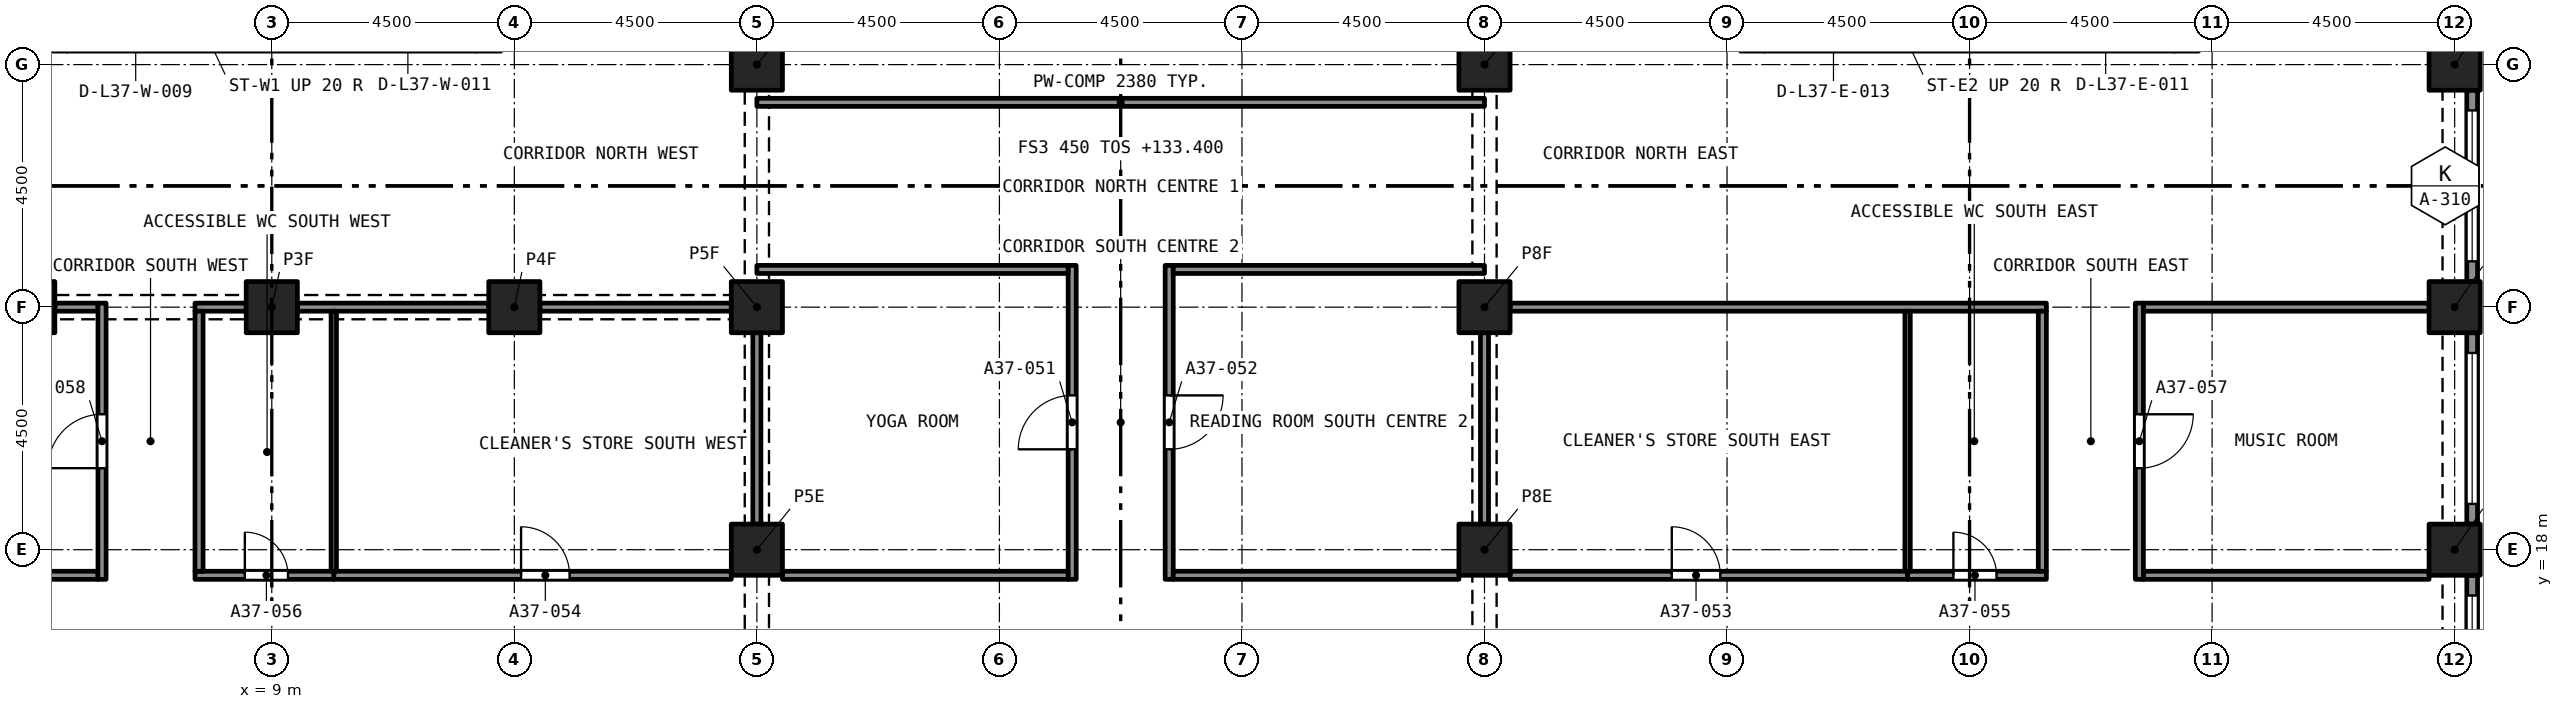
"""IFC4 building model, lengths in metres.
Left out: names, types, materials, properties, quantities, classifications, styles, units other than length and angle.
Written with IfcOpenShell. Run it as: python <this file> out.ifc"""

import sys

from ifc_helpers import new_model, si_unit, direction, frame, frame_2d, origin, origin_2d, place, context, subcontext, project, spatial, rectangle, extrude, element, fill, save


model = new_model("IFC4")
c1 = context("Model", 3, precision=1e-05, world=origin(), true_north=direction((0.0, 1.0)))
c2 = subcontext(c1, "Body", "Model", "MODEL_VIEW")
j1 = project(units=[si_unit("LENGTHUNIT", "METRE"), si_unit("PLANEANGLEUNIT", "RADIAN")], contexts=[c1])
p1 = place(None, origin())
s1 = spatial("IfcSite", under=j1, at=p1, CompositionType="ELEMENT")
p2 = place(p1, origin())
s2 = spatial("IfcBuilding", under=s1, at=p2, CompositionType="ELEMENT")
p3 = place(p2, frame((0.0, 0.0, 133.4)))
s3 = spatial("IfcBuildingStorey", under=s2, at=p3, CompositionType="ELEMENT", Elevation=133.4)
for number, where, z_axis, x_axis in (
    (1, (18.0, 18.0, 0.0), (0.0, 0.0, 1.0), (1.0, 0.0, 0.0)),
    (2, (31.5, 18.0, 0.0), (0.0, 0.0, 1.0), (1.0, 0.0, 0.0)),
    (3, (49.5, 18.0, 0.0), (0.0, 0.0, 1.0), (1.0, 0.0, 0.0)),
    (4, (4.5, 22.5, 0.0), (0.0, 0.0, 1.0), (1.0, 0.0, 0.0)),
    (5, (9.0, 22.5, 0.0), (0.0, 0.0, 1.0), (1.0, 0.0, 0.0)),
    (6, (13.5, 22.5, 0.0), (0.0, 0.0, 1.0), (1.0, 0.0, 0.0)),
    (7, (18.0, 22.5, 0.0), (0.0, 0.0, 1.0), (1.0, 0.0, 0.0)),
    (8, (31.5, 22.5, 0.0), (0.0, 0.0, 1.0), (1.0, 0.0, 0.0)),
    (9, (49.5, 22.5, 0.0), (0.0, 0.0, 1.0), (1.0, 0.0, 0.0)),
    (10, (18.0, 27.0, 0.0), (0.0, 0.0, 1.0), (1.0, 0.0, 0.0)),
    (11, (31.5, 27.0, 0.0), (0.0, 0.0, 1.0), (1.0, 0.0, 0.0)),
    (12, (49.5, 27.0, 0.0), (0.0, 0.0, 1.0), (1.0, 0.0, 0.0)),
):
    element("IfcColumn", number, at=place(p3, frame(where, z_axis=z_axis, x_axis=x_axis)), inside=s3, PredefinedType="COLUMN", context=c2, shape_type="SweptSolid", body=[
        extrude(rectangle(XDim=0.95, YDim=0.95, at=origin_2d()), origin(), (0.0, 0.0, 1.0), 3.2),
    ])
p4 = place(p3, frame((49.825, 17.525, 0.0), z_axis=(0.0, 0.0, 1.0), x_axis=(0.0, -1.0, 0.0)))
e13 = element("IfcWall", 13, at=p4, inside=s3, PredefinedType="SOLIDWALL", context=c2, shape_type="SweptSolid", body=[
    extrude(rectangle(XDim=3.55, YDim=0.2, at=frame_2d((1.775, 0.0))), origin(), (0.0, 0.0, 1.0), 3.2),
])
p5 = place(p4, frame((0.375, 0.0, 0.45)))
e14 = element("IfcOpeningElement", 14, at=p5, cuts=e13, PredefinedType="OPENING", context=c2, shape_type="SweptSolid", body=[
    extrude(rectangle(XDim=2.8, YDim=1.95, at=frame_2d((1.4, 0.975))), frame((0.0, 0.11, 0.0), z_axis=(0.0, -1.0, 0.0), x_axis=(1.0, 0.0, 0.0)), (0.0, 0.0, 1.0), 0.22),
])
p6 = place(p3, frame((49.825, 22.025, 0.0), z_axis=(0.0, 0.0, 1.0), x_axis=(0.0, -1.0, 0.0)))
e15 = element("IfcWall", 15, at=p6, inside=s3, PredefinedType="SOLIDWALL", context=c2, shape_type="SweptSolid", body=[
    extrude(rectangle(XDim=3.55, YDim=0.2, at=frame_2d((1.775, 0.0))), origin(), (0.0, 0.0, 1.0), 3.2),
])
p7 = place(p6, frame((0.375, 0.0, 0.45)))
e16 = element("IfcOpeningElement", 16, at=p7, cuts=e15, PredefinedType="OPENING", context=c2, shape_type="SweptSolid", body=[
    extrude(rectangle(XDim=2.8, YDim=1.95, at=frame_2d((1.4, 0.975))), frame((0.0, 0.11, 0.0), z_axis=(0.0, -1.0, 0.0), x_axis=(1.0, 0.0, 0.0)), (0.0, 0.0, 1.0), 0.22),
])
p8 = place(p3, frame((49.825, 26.525, 0.0), z_axis=(0.0, 0.0, 1.0), x_axis=(0.0, -1.0, 0.0)))
e17 = element("IfcWall", 17, at=p8, inside=s3, PredefinedType="SOLIDWALL", context=c2, shape_type="SweptSolid", body=[
    extrude(rectangle(XDim=3.55, YDim=0.2, at=frame_2d((1.775, 0.0))), origin(), (0.0, 0.0, 1.0), 3.2),
])
p9 = place(p8, frame((0.375, 0.0, 0.45)))
e18 = element("IfcOpeningElement", 18, at=p9, cuts=e17, PredefinedType="OPENING", context=c2, shape_type="SweptSolid", body=[
    extrude(rectangle(XDim=2.8, YDim=1.95, at=frame_2d((1.4, 0.975))), frame((0.0, 0.11, 0.0), z_axis=(0.0, -1.0, 0.0), x_axis=(1.0, 0.0, 0.0)), (0.0, 0.0, 1.0), 0.22),
])
p10 = place(p3, frame((23.85, 17.45, 0.0), z_axis=(0.0, 0.0, 1.0), x_axis=(0.0, 1.0, 0.0)))
e19 = element("IfcWall", 19, at=p10, inside=s3, PredefinedType="PARTITIONING", context=c2, shape_type="SweptSolid", body=[
    extrude(rectangle(XDim=5.825, YDim=0.15, at=frame_2d((2.913, 0.0))), origin(), (0.0, 0.0, 1.0), 2.75),
])
p11 = place(p10, frame((2.413, 0.0, 0.0)))
e20 = element("IfcOpeningElement", 20, at=p11, cuts=e19, PredefinedType="OPENING", context=c2, shape_type="SweptSolid", body=[
    extrude(rectangle(XDim=1.0, YDim=2.1, at=frame_2d((0.5, 1.05))), frame((0.0, 0.085, 0.0), z_axis=(0.0, -1.0, 0.0), x_axis=(1.0, 0.0, 0.0)), (0.0, 0.0, 1.0), 0.17),
])
p12 = place(p3, frame((25.65, 23.275, 0.0), z_axis=(0.0, 0.0, 1.0), x_axis=(0.0, -1.0, 0.0)))
e21 = element("IfcWall", 21, at=p12, inside=s3, PredefinedType="PARTITIONING", context=c2, shape_type="SweptSolid", body=[
    extrude(rectangle(XDim=5.825, YDim=0.15, at=frame_2d((2.913, 0.0))), origin(), (0.0, 0.0, 1.0), 2.75),
])
p13 = place(p12, frame((2.413, 0.0, 0.0)))
e22 = element("IfcOpeningElement", 22, at=p13, cuts=e21, PredefinedType="OPENING", context=c2, shape_type="SweptSolid", body=[
    extrude(rectangle(XDim=1.0, YDim=2.1, at=frame_2d((0.5, 1.05))), frame((0.0, 0.085, 0.0), z_axis=(0.0, -1.0, 0.0), x_axis=(1.0, 0.0, 0.0)), (0.0, 0.0, 1.0), 0.17),
])
for number, where, z_axis, x_axis in (
    (23, (18.475, 17.525, 0.0), (0.0, 0.0, 1.0), (1.0, 0.0, 0.0)),
    (24, (25.725, 17.525, 0.0), (0.0, 0.0, 1.0), (1.0, 0.0, 0.0)),
):
    element("IfcWall", number, at=place(p3, frame(where, z_axis=z_axis, x_axis=x_axis)), inside=s3, PredefinedType="PARTITIONING", context=c2, shape_type="SweptSolid", body=[
        extrude(rectangle(XDim=5.3, YDim=0.15, at=frame_2d((2.65, 0.0))), origin(), (0.0, 0.0, 1.0), 2.75),
    ])
p14 = place(p3, frame((31.975, 17.525, 0.0), z_axis=(0.0, 0.0, 1.0), x_axis=(1.0, 0.0, 0.0)))
e25 = element("IfcWall", 25, at=p14, inside=s3, PredefinedType="PARTITIONING", context=c2, shape_type="SweptSolid", body=[
    extrude(rectangle(XDim=7.375, YDim=0.15, at=frame_2d((3.688, 0.0))), origin(), (0.0, 0.0, 1.0), 2.9),
])
p15 = place(p14, frame((3.0, 0.0, 0.0)))
e26 = element("IfcOpeningElement", 26, at=p15, cuts=e25, PredefinedType="OPENING", context=c2, shape_type="SweptSolid", body=[
    extrude(rectangle(XDim=0.9, YDim=2.1, at=frame_2d((0.45, 1.05))), frame((0.0, 0.085, 0.0), z_axis=(0.0, -1.0, 0.0), x_axis=(1.0, 0.0, 0.0)), (0.0, 0.0, 1.0), 0.17),
])
p16 = place(p3, frame((10.15, 17.525, 0.0), z_axis=(0.0, 0.0, 1.0), x_axis=(1.0, 0.0, 0.0)))
e27 = element("IfcWall", 27, at=p16, inside=s3, PredefinedType="PARTITIONING", context=c2, shape_type="SweptSolid", body=[
    extrude(rectangle(XDim=7.375, YDim=0.15, at=frame_2d((3.688, 0.0))), origin(), (0.0, 0.0, 1.0), 2.9),
])
p17 = place(p16, frame((3.475, 0.0, 0.0)))
e28 = element("IfcOpeningElement", 28, at=p17, cuts=e27, PredefinedType="OPENING", context=c2, shape_type="SweptSolid", body=[
    extrude(rectangle(XDim=0.9, YDim=2.1, at=frame_2d((0.45, 1.05))), frame((0.0, 0.085, 0.0), z_axis=(0.0, -1.0, 0.0), x_axis=(1.0, 0.0, 0.0)), (0.0, 0.0, 1.0), 0.17),
])
p18 = place(p3, frame((39.35, 17.525, 0.0), z_axis=(0.0, 0.0, 1.0), x_axis=(1.0, 0.0, 0.0)))
e29 = element("IfcWall", 29, at=p18, inside=s3, PredefinedType="PARTITIONING", context=c2, shape_type="SweptSolid", body=[
    extrude(rectangle(XDim=2.575, YDim=0.15, at=frame_2d((1.288, 0.0))), origin(), (0.0, 0.0, 1.0), 2.9),
])
p19 = place(p18, frame((0.85, 0.0, 0.0)))
e30 = element("IfcOpeningElement", 30, at=p19, cuts=e29, PredefinedType="OPENING", context=c2, shape_type="SweptSolid", body=[
    extrude(rectangle(XDim=0.8, YDim=2.1, at=frame_2d((0.4, 1.05))), frame((0.0, 0.085, 0.0), z_axis=(0.0, -1.0, 0.0), x_axis=(1.0, 0.0, 0.0)), (0.0, 0.0, 1.0), 0.17),
])
p20 = place(p3, frame((7.575, 17.525, 0.0), z_axis=(0.0, 0.0, 1.0), x_axis=(1.0, 0.0, 0.0)))
e31 = element("IfcWall", 31, at=p20, inside=s3, PredefinedType="PARTITIONING", context=c2, shape_type="SweptSolid", body=[
    extrude(rectangle(XDim=2.575, YDim=0.15, at=frame_2d((1.288, 0.0))), origin(), (0.0, 0.0, 1.0), 2.9),
])
p21 = place(p20, frame((0.925, 0.0, 0.0)))
e32 = element("IfcOpeningElement", 32, at=p21, cuts=e31, PredefinedType="OPENING", context=c2, shape_type="SweptSolid", body=[
    extrude(rectangle(XDim=0.8, YDim=2.1, at=frame_2d((0.4, 1.05))), frame((0.0, 0.085, 0.0), z_axis=(0.0, -1.0, 0.0), x_axis=(1.0, 0.0, 0.0)), (0.0, 0.0, 1.0), 0.17),
])
for number, where, z_axis, x_axis in (
    (33, (43.725, 17.525, 0.0), (0.0, 0.0, 1.0), (1.0, 0.0, 0.0)),
    (34, (0.475, 17.525, 0.0), (0.0, 0.0, 1.0), (1.0, 0.0, 0.0)),
):
    element("IfcWall", number, at=place(p3, frame(where, z_axis=z_axis, x_axis=x_axis)), inside=s3, PredefinedType="PARTITIONING", context=c2, shape_type="SweptSolid", body=[
        extrude(rectangle(XDim=5.3, YDim=0.15, at=frame_2d((2.65, 0.0))), origin(), (0.0, 0.0, 1.0), 2.9),
    ])
p22 = place(p3, frame((18.0, 26.3, 0.0), z_axis=(0.0, 0.0, 1.0), x_axis=(1.0, 0.0, 0.0)))
e35 = element("IfcWall", 35, at=p22, inside=s3, PredefinedType="PARTITIONING", context=c2, shape_type="SweptSolid", body=[
    extrude(rectangle(XDim=13.5, YDim=0.15, at=frame_2d((6.75, 0.0))), origin(), (0.0, 0.0, 1.0), 2.38),
])
p23 = place(p3, frame((18.0, 23.2, 0.0), z_axis=(0.0, 0.0, 1.0), x_axis=(1.0, 0.0, 0.0)))
e36 = element("IfcWall", 36, at=p23, inside=s3, PredefinedType="PARTITIONING", context=c2, shape_type="SweptSolid", body=[
    extrude(rectangle(XDim=5.775, YDim=0.15, at=frame_2d((2.887, 0.0))), origin(), (0.0, 0.0, 1.0), 2.75),
])
p24 = place(p3, frame((18.0, 18.475, 0.0), z_axis=(0.0, 0.0, 1.0), x_axis=(0.0, 1.0, 0.0)))
e37 = element("IfcWall", 37, at=p24, inside=s3, PredefinedType="PARTITIONING", context=c2, shape_type="SweptSolid", body=[
    extrude(rectangle(XDim=3.55, YDim=0.15, at=frame_2d((1.775, 0.0))), origin(), (0.0, 0.0, 1.0), 2.38),
])
p25 = place(p3, frame((25.725, 23.2, 0.0), z_axis=(0.0, 0.0, 1.0), x_axis=(1.0, 0.0, 0.0)))
e38 = element("IfcWall", 38, at=p25, inside=s3, PredefinedType="PARTITIONING", context=c2, shape_type="SweptSolid", body=[
    extrude(rectangle(XDim=5.775, YDim=0.15, at=frame_2d((2.887, 0.0))), origin(), (0.0, 0.0, 1.0), 2.75),
])
p26 = place(p3, frame((31.5, 18.475, 0.0), z_axis=(0.0, 0.0, 1.0), x_axis=(0.0, 1.0, 0.0)))
e39 = element("IfcWall", 39, at=p26, inside=s3, PredefinedType="PARTITIONING", context=c2, shape_type="SweptSolid", body=[
    extrude(rectangle(XDim=3.55, YDim=0.15, at=frame_2d((1.775, 0.0))), origin(), (0.0, 0.0, 1.0), 2.38),
])
p27 = place(p3, frame((31.975, 22.5, 0.0), z_axis=(0.0, 0.0, 1.0), x_axis=(1.0, 0.0, 0.0)))
e40 = element("IfcWall", 40, at=p27, inside=s3, PredefinedType="PARTITIONING", context=c2, shape_type="SweptSolid", body=[
    extrude(rectangle(XDim=9.95, YDim=0.15, at=frame_2d((4.975, 0.0))), origin(), (0.0, 0.0, 1.0), 2.9),
])
p28 = place(p3, frame((43.725, 22.5, 0.0), z_axis=(0.0, 0.0, 1.0), x_axis=(1.0, 0.0, 0.0)))
e41 = element("IfcWall", 41, at=p28, inside=s3, PredefinedType="PARTITIONING", context=c2, shape_type="SweptSolid", body=[
    extrude(rectangle(XDim=5.3, YDim=0.15, at=frame_2d((2.65, 0.0))), origin(), (0.0, 0.0, 1.0), 2.9),
])
for number, where, z_axis, x_axis in (
    (42, (13.975, 22.5, 0.0), (0.0, 0.0, 1.0), (1.0, 0.0, 0.0)),
    (43, (9.475, 22.5, 0.0), (0.0, 0.0, 1.0), (1.0, 0.0, 0.0)),
):
    element("IfcWall", number, at=place(p3, frame(where, z_axis=z_axis, x_axis=x_axis)), inside=s3, PredefinedType="PARTITIONING", context=c2, shape_type="SweptSolid", body=[
        extrude(rectangle(XDim=3.55, YDim=0.15, at=frame_2d((1.775, 0.0))), origin(), (0.0, 0.0, 1.0), 2.38),
    ])
p29 = place(p3, frame((7.575, 22.5, 0.0), z_axis=(0.0, 0.0, 1.0), x_axis=(1.0, 0.0, 0.0)))
e44 = element("IfcWall", 44, at=p29, inside=s3, PredefinedType="PARTITIONING", context=c2, shape_type="SweptSolid", body=[
    extrude(rectangle(XDim=0.95, YDim=0.15, at=frame_2d((0.475, 0.0))), origin(), (0.0, 0.0, 1.0), 2.38),
])
p30 = place(p3, frame((4.975, 22.5, 0.0), z_axis=(0.0, 0.0, 1.0), x_axis=(1.0, 0.0, 0.0)))
e45 = element("IfcWall", 45, at=p30, inside=s3, PredefinedType="PARTITIONING", context=c2, shape_type="SweptSolid", body=[
    extrude(rectangle(XDim=0.8, YDim=0.15, at=frame_2d((0.4, 0.0))), origin(), (0.0, 0.0, 1.0), 2.38),
])
p31 = place(p3, frame((41.85, 17.6, 0.0), z_axis=(0.0, 0.0, 1.0), x_axis=(0.0, 1.0, 0.0)))
e46 = element("IfcWall", 46, at=p31, inside=s3, PredefinedType="PARTITIONING", context=c2, shape_type="SweptSolid", body=[
    extrude(rectangle(XDim=4.825, YDim=0.15, at=frame_2d((2.413, 0.0))), origin(), (0.0, 0.0, 1.0), 2.9),
])
p32 = place(p3, frame((43.65, 22.575, 0.0), z_axis=(0.0, 0.0, 1.0), x_axis=(0.0, -1.0, 0.0)))
e47 = element("IfcWall", 47, at=p32, inside=s3, PredefinedType="PARTITIONING", context=c2, shape_type="SweptSolid", body=[
    extrude(rectangle(XDim=5.125, YDim=0.15, at=frame_2d((2.562, 0.0))), origin(), (0.0, 0.0, 1.0), 2.9),
])
p33 = place(p32, frame((2.062, 0.0, 0.0)))
e48 = element("IfcOpeningElement", 48, at=p33, cuts=e47, PredefinedType="OPENING", context=c2, shape_type="SweptSolid", body=[
    extrude(rectangle(XDim=1.0, YDim=2.1, at=frame_2d((0.5, 1.05))), frame((0.0, 0.085, 0.0), z_axis=(0.0, -1.0, 0.0), x_axis=(1.0, 0.0, 0.0)), (0.0, 0.0, 1.0), 0.17),
])
p34 = place(p3, frame((7.65, 17.6, 0.0), z_axis=(0.0, 0.0, 1.0), x_axis=(0.0, 1.0, 0.0)))
e49 = element("IfcWall", 49, at=p34, inside=s3, PredefinedType="PARTITIONING", context=c2, shape_type="SweptSolid", body=[
    extrude(rectangle(XDim=4.825, YDim=0.15, at=frame_2d((2.413, 0.0))), origin(), (0.0, 0.0, 1.0), 2.9),
])
p35 = place(p3, frame((5.85, 17.45, 0.0), z_axis=(0.0, 0.0, 1.0), x_axis=(0.0, 1.0, 0.0)))
e50 = element("IfcWall", 50, at=p35, inside=s3, PredefinedType="PARTITIONING", context=c2, shape_type="SweptSolid", body=[
    extrude(rectangle(XDim=5.125, YDim=0.15, at=frame_2d((2.562, 0.0))), origin(), (0.0, 0.0, 1.0), 2.9),
])
p36 = place(p35, frame((2.062, 0.0, 0.0)))
e51 = element("IfcOpeningElement", 51, at=p36, cuts=e50, PredefinedType="OPENING", context=c2, shape_type="SweptSolid", body=[
    extrude(rectangle(XDim=1.0, YDim=2.1, at=frame_2d((0.5, 1.05))), frame((0.0, 0.085, 0.0), z_axis=(0.0, -1.0, 0.0), x_axis=(1.0, 0.0, 0.0)), (0.0, 0.0, 1.0), 0.17),
])
for number, where, z_axis, x_axis in (
    (52, (39.35, 17.6, 0.0), (0.0, 0.0, 1.0), (0.0, 1.0, 0.0)),
    (53, (10.15, 17.6, 0.0), (0.0, 0.0, 1.0), (0.0, 1.0, 0.0)),
):
    element("IfcWall", number, at=place(p3, frame(where, z_axis=z_axis, x_axis=x_axis)), inside=s3, PredefinedType="PARTITIONING", context=c2, shape_type="SweptSolid", body=[
        extrude(rectangle(XDim=4.825, YDim=0.1, at=frame_2d((2.413, 0.0))), origin(), (0.0, 0.0, 1.0), 2.9),
    ])
p37 = place(p5, origin())
e54 = element("IfcWindow", 54, at=p37, inside=s3, PartitioningType="SINGLE_PANEL", PredefinedType="WINDOW", context=c2, shape_type="SweptSolid", body=[
    extrude(rectangle(XDim=2.8, YDim=1.95, at=frame_2d((1.4, 0.975))), frame((0.0, 0.03, 0.0), z_axis=(0.0, -1.0, 0.0), x_axis=(1.0, 0.0, 0.0)), (0.0, 0.0, 1.0), 0.06),
])
fill(e14, e54)
p38 = place(p7, origin())
e55 = element("IfcWindow", 55, at=p38, inside=s3, PartitioningType="SINGLE_PANEL", PredefinedType="WINDOW", context=c2, shape_type="SweptSolid", body=[
    extrude(rectangle(XDim=2.8, YDim=1.95, at=frame_2d((1.4, 0.975))), frame((0.0, 0.03, 0.0), z_axis=(0.0, -1.0, 0.0), x_axis=(1.0, 0.0, 0.0)), (0.0, 0.0, 1.0), 0.06),
])
fill(e16, e55)
p39 = place(p9, origin())
e56 = element("IfcWindow", 56, at=p39, inside=s3, PartitioningType="SINGLE_PANEL", PredefinedType="WINDOW", context=c2, shape_type="SweptSolid", body=[
    extrude(rectangle(XDim=2.8, YDim=1.95, at=frame_2d((1.4, 0.975))), frame((0.0, 0.03, 0.0), z_axis=(0.0, -1.0, 0.0), x_axis=(1.0, 0.0, 0.0)), (0.0, 0.0, 1.0), 0.06),
])
fill(e18, e56)
p40 = place(p11, origin())
e57 = element("IfcDoor", 57, at=p40, inside=s3, OperationType="SINGLE_SWING_LEFT", PredefinedType="DOOR", context=c2, shape_type="SweptSolid", body=[
    extrude(rectangle(XDim=1.0, YDim=2.1, at=frame_2d((0.5, 1.05))), frame((0.0, 0.025, 0.0), z_axis=(0.0, -1.0, 0.0), x_axis=(1.0, 0.0, 0.0)), (0.0, 0.0, 1.0), 0.05),
])
fill(e20, e57)
p41 = place(p13, origin())
e58 = element("IfcDoor", 58, at=p41, inside=s3, OperationType="SINGLE_SWING_RIGHT", PredefinedType="DOOR", context=c2, shape_type="SweptSolid", body=[
    extrude(rectangle(XDim=1.0, YDim=2.1, at=frame_2d((0.5, 1.05))), frame((0.0, 0.025, 0.0), z_axis=(0.0, -1.0, 0.0), x_axis=(1.0, 0.0, 0.0)), (0.0, 0.0, 1.0), 0.05),
])
fill(e22, e58)
p42 = place(p15, origin())
e59 = element("IfcDoor", 59, at=p42, inside=s3, OperationType="SINGLE_SWING_LEFT", PredefinedType="DOOR", context=c2, shape_type="SweptSolid", body=[
    extrude(rectangle(XDim=0.9, YDim=2.1, at=frame_2d((0.45, 1.05))), frame((0.0, 0.025, 0.0), z_axis=(0.0, -1.0, 0.0), x_axis=(1.0, 0.0, 0.0)), (0.0, 0.0, 1.0), 0.05),
])
fill(e26, e59)
p43 = place(p17, origin())
e60 = element("IfcDoor", 60, at=p43, inside=s3, OperationType="SINGLE_SWING_RIGHT", PredefinedType="DOOR", context=c2, shape_type="SweptSolid", body=[
    extrude(rectangle(XDim=0.9, YDim=2.1, at=frame_2d((0.45, 1.05))), frame((0.0, 0.025, 0.0), z_axis=(0.0, -1.0, 0.0), x_axis=(1.0, 0.0, 0.0)), (0.0, 0.0, 1.0), 0.05),
])
fill(e28, e60)
p44 = place(p19, origin())
e61 = element("IfcDoor", 61, at=p44, inside=s3, OperationType="SINGLE_SWING_LEFT", PredefinedType="DOOR", context=c2, shape_type="SweptSolid", body=[
    extrude(rectangle(XDim=0.8, YDim=2.1, at=frame_2d((0.4, 1.05))), frame((0.0, 0.025, 0.0), z_axis=(0.0, -1.0, 0.0), x_axis=(1.0, 0.0, 0.0)), (0.0, 0.0, 1.0), 0.05),
])
fill(e30, e61)
p45 = place(p21, origin())
e62 = element("IfcDoor", 62, at=p45, inside=s3, OperationType="SINGLE_SWING_RIGHT", PredefinedType="DOOR", context=c2, shape_type="SweptSolid", body=[
    extrude(rectangle(XDim=0.8, YDim=2.1, at=frame_2d((0.4, 1.05))), frame((0.0, 0.025, 0.0), z_axis=(0.0, -1.0, 0.0), x_axis=(1.0, 0.0, 0.0)), (0.0, 0.0, 1.0), 0.05),
])
fill(e32, e62)
p46 = place(p33, origin())
e63 = element("IfcDoor", 63, at=p46, inside=s3, OperationType="SINGLE_SWING_RIGHT", PredefinedType="DOOR", context=c2, shape_type="SweptSolid", body=[
    extrude(rectangle(XDim=1.0, YDim=2.1, at=frame_2d((0.5, 1.05))), frame((0.0, 0.025, 0.0), z_axis=(0.0, -1.0, 0.0), x_axis=(1.0, 0.0, 0.0)), (0.0, 0.0, 1.0), 0.05),
])
fill(e48, e63)
p47 = place(p36, origin())
e64 = element("IfcDoor", 64, at=p47, inside=s3, OperationType="SINGLE_SWING_RIGHT", PredefinedType="DOOR", context=c2, shape_type="SweptSolid", body=[
    extrude(rectangle(XDim=1.0, YDim=2.1, at=frame_2d((0.5, 1.05))), frame((0.0, 0.025, 0.0), z_axis=(0.0, -1.0, 0.0), x_axis=(1.0, 0.0, 0.0)), (0.0, 0.0, 1.0), 0.05),
])
fill(e51, e64)
save(model, sys.argv[1])
